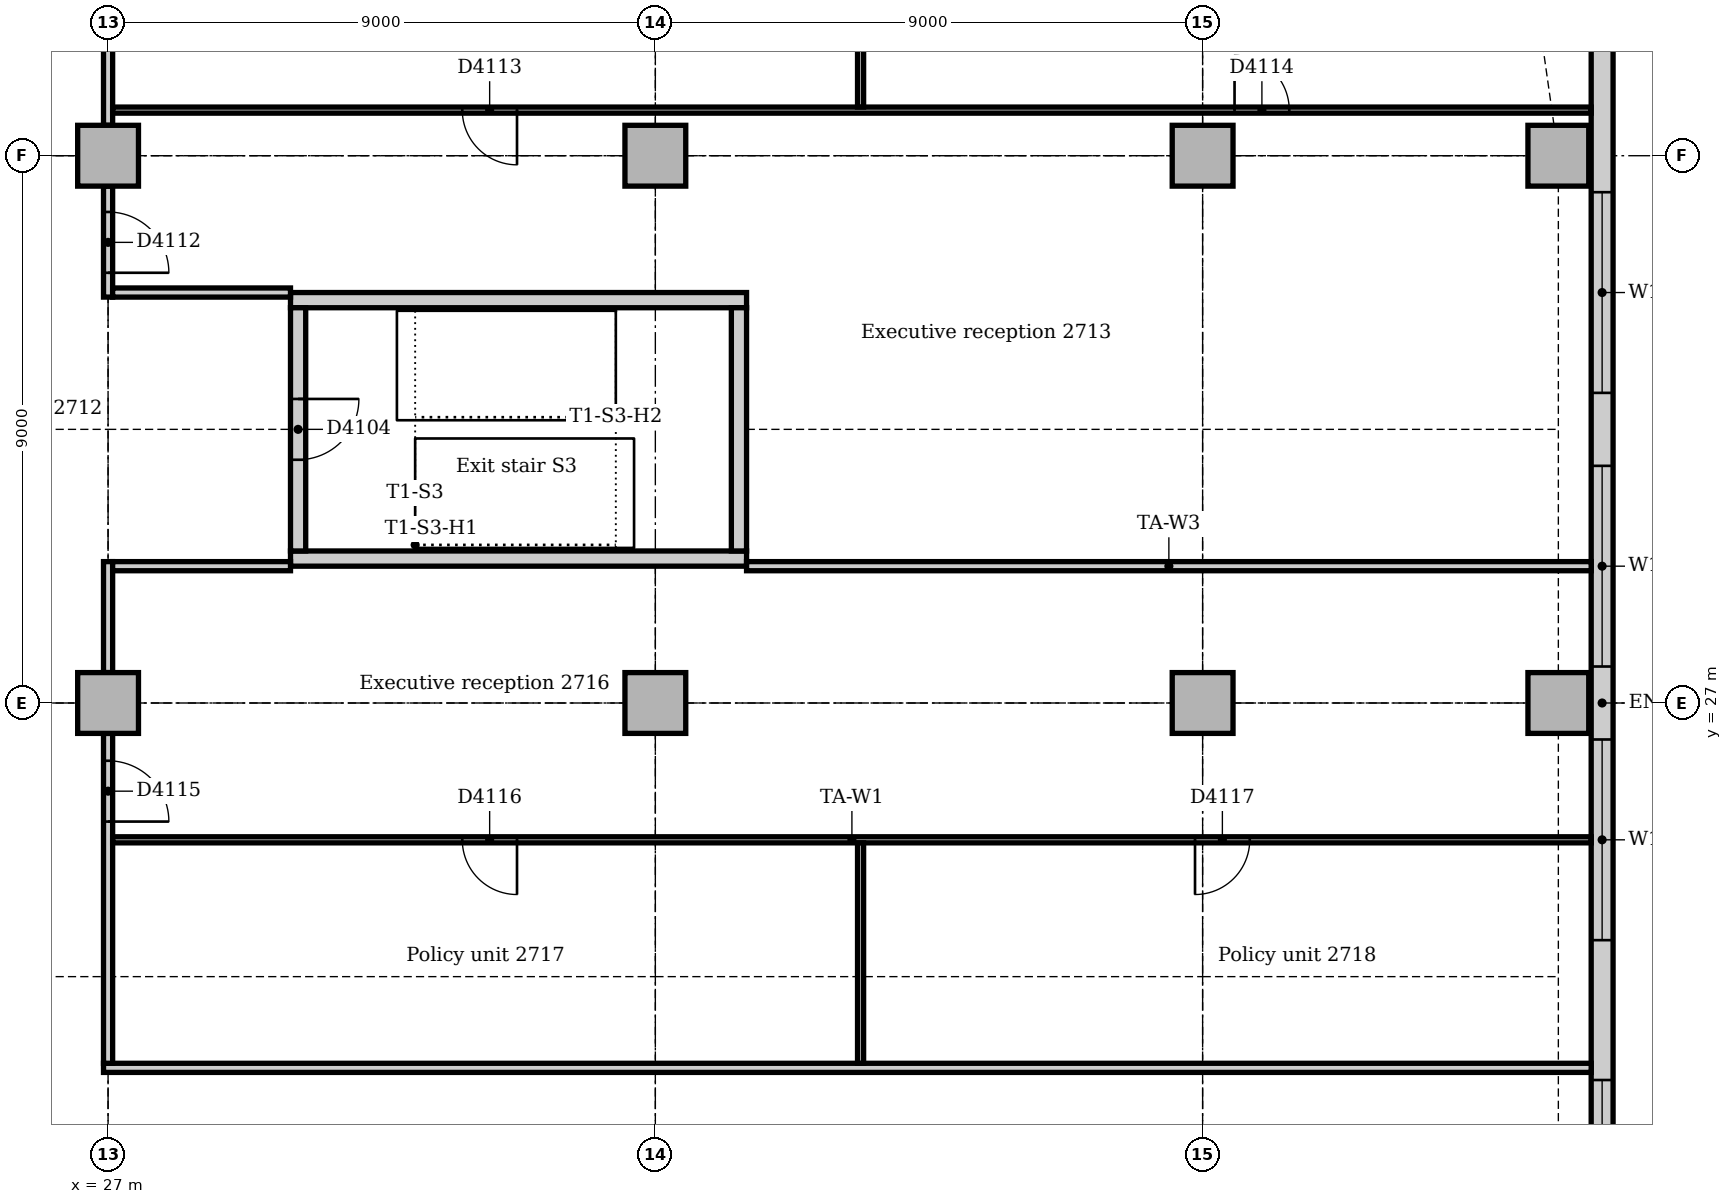
"""IFC4 building model, lengths in metres.
Left out: names, types, materials, properties, quantities, classifications, styles, units other than length and angle.
Written with IfcOpenShell. Run it as: python <this file> out.ifc"""

import sys

from ifc_helpers import new_model, si_unit, direction, frame, frame_2d, origin, origin_2d, place, context, subcontext, project, spatial, rectangle, extrude, element, fill, save


model = new_model("IFC4")
c1 = context("Model", 3, precision=1e-05, world=origin(), true_north=direction((0.0, 1.0)))
c2 = subcontext(c1, "Body", "Model", "MODEL_VIEW")
j1 = project(units=[si_unit("LENGTHUNIT", "METRE"), si_unit("PLANEANGLEUNIT", "RADIAN")], contexts=[c1])
p1 = place(None, origin())
s1 = spatial("IfcSite", under=j1, at=p1, CompositionType="ELEMENT")
p2 = place(p1, origin())
s2 = spatial("IfcBuilding", under=s1, at=p2, CompositionType="ELEMENT")
p3 = place(p2, frame((0.0, 0.0, 116.0)))
s3 = spatial("IfcBuildingStorey", under=s2, at=p3, CompositionType="ELEMENT", Elevation=116.0)
for number, where, z_axis, x_axis in (
    (1, (30.0, 29.375, 0.0), (0.0, 0.0, 1.0), (1.0, 0.0, 0.0)),
    (2, (37.5, 33.625, 0.0), (0.0, 0.0, 1.0), (-1.0, 0.0, 0.0)),
):
    element("IfcWall", number, at=place(p3, frame(where, z_axis=z_axis, x_axis=x_axis)), inside=s3, PredefinedType="SOLIDWALL", context=c2, shape_type="SweptSolid", body=[
        extrude(rectangle(XDim=7.5, YDim=0.25, at=frame_2d((3.75, 0.0))), origin(), (0.0, 0.0, 1.0), 4.0),
    ])
p4 = place(p3, frame((37.375, 29.5, 0.0), z_axis=(0.0, 0.0, 1.0), x_axis=(0.0, 1.0, 0.0)))
e3 = element("IfcWall", 3, at=p4, inside=s3, PredefinedType="SOLIDWALL", context=c2, shape_type="SweptSolid", body=[
    extrude(rectangle(XDim=4.0, YDim=0.25, at=frame_2d((2.0, 0.0))), origin(), (0.0, 0.0, 1.0), 4.0),
])
p5 = place(p3, frame((30.125, 33.5, 0.0), z_axis=(0.0, 0.0, 1.0), x_axis=(0.0, -1.0, 0.0)))
e4 = element("IfcWall", 4, at=p5, inside=s3, PredefinedType="SOLIDWALL", context=c2, shape_type="SweptSolid", body=[
    extrude(rectangle(XDim=4.0, YDim=0.25, at=frame_2d((2.0, 0.0))), origin(), (0.0, 0.0, 1.0), 4.0),
])
p6 = place(p5, frame((1.5, 0.0, 0.0)))
e5 = element("IfcOpeningElement", 5, at=p6, cuts=e4, PredefinedType="OPENING", context=c2, shape_type="SweptSolid", body=[
    extrude(rectangle(XDim=1.0, YDim=2.1, at=frame_2d((0.5, 1.05))), frame((0.0, 0.135, 0.0), z_axis=(0.0, -1.0, 0.0), x_axis=(1.0, 0.0, 0.0)), (0.0, 0.0, 1.0), 0.27),
])
for number, where, z_axis, x_axis in (
    (6, (50.85, 27.0, 0.0), (0.0, 0.0, 1.0), (1.0, 0.0, 0.0)),
    (7, (50.85, 36.0, 0.0), (0.0, 0.0, 1.0), (1.0, 0.0, 0.0)),
    (8, (27.0, 27.0, 0.0), (0.0, 0.0, 1.0), (1.0, 0.0, 0.0)),
    (9, (27.0, 36.0, 0.0), (0.0, 0.0, 1.0), (1.0, 0.0, 0.0)),
    (10, (36.0, 27.0, 0.0), (0.0, 0.0, 1.0), (1.0, 0.0, 0.0)),
    (11, (36.0, 36.0, 0.0), (0.0, 0.0, 1.0), (1.0, 0.0, 0.0)),
    (12, (45.0, 27.0, 0.0), (0.0, 0.0, 1.0), (1.0, 0.0, 0.0)),
    (13, (45.0, 36.0, 0.0), (0.0, 0.0, 1.0), (1.0, 0.0, 0.0)),
):
    element("IfcColumn", number, at=place(p3, frame(where, z_axis=z_axis, x_axis=x_axis)), inside=s3, PredefinedType="COLUMN", context=c2, shape_type="SweptSolid", body=[
        extrude(rectangle(XDim=1.0, YDim=1.0, at=origin_2d()), origin(), (0.0, 0.0, 1.0), 3.85),
    ])
p7 = place(p3, frame((51.57, 14.743, 0.0), z_axis=(0.0, 0.0, 1.0), x_axis=(0.0, 1.0, 0.0)))
e14 = element("IfcWall", 14, at=p7, inside=s3, PredefinedType="STANDARD", context=c2, shape_type="SweptSolid", body=[
    extrude(rectangle(XDim=24.515, YDim=0.36, at=frame_2d((12.257, 0.0))), origin(), (0.0, 0.0, 1.0), 3.85),
])
p8 = place(p7, frame((4.257, 0.0, 0.9)))
e15 = element("IfcOpeningElement", 15, at=p8, cuts=e14, PredefinedType="OPENING", context=c2, shape_type="SweptSolid", body=[
    extrude(rectangle(XDim=1.8, YDim=1.6, at=frame_2d((0.9, 0.8))), frame((0.0, 0.19, 0.0), z_axis=(0.0, -1.0, 0.0), x_axis=(1.0, 0.0, 0.0)), (0.0, 0.0, 1.0), 0.38),
])
p9 = place(p7, frame((8.357, 0.0, 0.9)))
e16 = element("IfcOpeningElement", 16, at=p9, cuts=e14, PredefinedType="OPENING", context=c2, shape_type="SweptSolid", body=[
    extrude(rectangle(XDim=3.3, YDim=1.6, at=frame_2d((1.65, 0.8))), frame((0.0, 0.19, 0.0), z_axis=(0.0, -1.0, 0.0), x_axis=(1.0, 0.0, 0.0)), (0.0, 0.0, 1.0), 0.38),
])
p10 = place(p7, frame((12.857, 0.0, 0.9)))
e17 = element("IfcOpeningElement", 17, at=p10, cuts=e14, PredefinedType="OPENING", context=c2, shape_type="SweptSolid", body=[
    extrude(rectangle(XDim=3.3, YDim=1.6, at=frame_2d((1.65, 0.8))), frame((0.0, 0.19, 0.0), z_axis=(0.0, -1.0, 0.0), x_axis=(1.0, 0.0, 0.0)), (0.0, 0.0, 1.0), 0.38),
])
p11 = place(p7, frame((17.357, 0.0, 0.9)))
e18 = element("IfcOpeningElement", 18, at=p11, cuts=e14, PredefinedType="OPENING", context=c2, shape_type="SweptSolid", body=[
    extrude(rectangle(XDim=3.3, YDim=1.6, at=frame_2d((1.65, 0.8))), frame((0.0, 0.19, 0.0), z_axis=(0.0, -1.0, 0.0), x_axis=(1.0, 0.0, 0.0)), (0.0, 0.0, 1.0), 0.38),
])
p12 = place(p3, frame((26.925, 21.0, 0.0), z_axis=(0.0, 0.0, 1.0), x_axis=(1.0, 0.0, 0.0)))
e19 = element("IfcWall", 19, at=p12, inside=s3, PredefinedType="PARTITIONING", context=c2, shape_type="SweptSolid", body=[
    extrude(rectangle(XDim=24.465, YDim=0.15, at=frame_2d((12.232, 0.0))), origin(), (0.0, 0.0, 1.0), 3.85),
])
p13 = place(p3, frame((27.0, 33.675, 0.0), z_axis=(0.0, 0.0, 1.0), x_axis=(0.0, 1.0, 0.0)))
e20 = element("IfcWall", 20, at=p13, inside=s3, PredefinedType="PARTITIONING", context=c2, shape_type="SweptSolid", body=[
    extrude(rectangle(XDim=1.825, YDim=0.15, at=frame_2d((0.912, 0.0))), origin(), (0.0, 0.0, 1.0), 3.256),
])
p14 = place(p13, frame((0.4, 0.0, 0.0)))
e21 = element("IfcOpeningElement", 21, at=p14, cuts=e20, PredefinedType="OPENING", context=c2, shape_type="SweptSolid", body=[
    extrude(rectangle(XDim=1.0, YDim=2.1, at=frame_2d((0.5, 1.05))), frame((0.0, 0.085, 0.0), z_axis=(0.0, -1.0, 0.0), x_axis=(1.0, 0.0, 0.0)), (0.0, 0.0, 1.0), 0.17),
])
p15 = place(p3, frame((27.0, 36.5, 0.0), z_axis=(0.0, 0.0, 1.0), x_axis=(0.0, 1.0, 0.0)))
e22 = element("IfcWall", 22, at=p15, inside=s3, PredefinedType="PARTITIONING", context=c2, shape_type="SweptSolid", body=[
    extrude(rectangle(XDim=7.1, YDim=0.15, at=frame_2d((3.55, 0.0))), origin(), (0.0, 0.0, 1.0), 3.256),
])
p16 = place(p3, frame((27.0, 21.075, 0.0), z_axis=(0.0, 0.0, 1.0), x_axis=(0.0, 1.0, 0.0)))
e23 = element("IfcWall", 23, at=p16, inside=s3, PredefinedType="PARTITIONING", context=c2, shape_type="SweptSolid", body=[
    extrude(rectangle(XDim=5.425, YDim=0.15, at=frame_2d((2.712, 0.0))), origin(), (0.0, 0.0, 1.0), 3.256),
])
p17 = place(p16, frame((3.975, 0.0, 0.0)))
e24 = element("IfcOpeningElement", 24, at=p17, cuts=e23, PredefinedType="OPENING", context=c2, shape_type="SweptSolid", body=[
    extrude(rectangle(XDim=1.0, YDim=2.1, at=frame_2d((0.5, 1.05))), frame((0.0, 0.085, 0.0), z_axis=(0.0, -1.0, 0.0), x_axis=(1.0, 0.0, 0.0)), (0.0, 0.0, 1.0), 0.17),
])
p18 = place(p3, frame((27.0, 27.5, 0.0), z_axis=(0.0, 0.0, 1.0), x_axis=(0.0, 1.0, 0.0)))
e25 = element("IfcWall", 25, at=p18, inside=s3, PredefinedType="PARTITIONING", context=c2, shape_type="SweptSolid", body=[
    extrude(rectangle(XDim=1.825, YDim=0.15, at=frame_2d((0.912, 0.0))), origin(), (0.0, 0.0, 1.0), 3.256),
])
for number, where, z_axis, x_axis in (
    (26, (27.075, 29.25, 0.0), (0.0, 0.0, 1.0), (1.0, 0.0, 0.0)),
    (27, (27.075, 33.75, 0.0), (0.0, 0.0, 1.0), (1.0, 0.0, 0.0)),
):
    element("IfcWall", number, at=place(p3, frame(where, z_axis=z_axis, x_axis=x_axis)), inside=s3, PredefinedType="PARTITIONING", context=c2, shape_type="SweptSolid", body=[
        extrude(rectangle(XDim=2.925, YDim=0.15, at=frame_2d((1.462, 0.0))), origin(), (0.0, 0.0, 1.0), 3.85),
    ])
p19 = place(p3, frame((37.5, 29.25, 0.0), z_axis=(0.0, 0.0, 1.0), x_axis=(1.0, 0.0, 0.0)))
e28 = element("IfcWall", 28, at=p19, inside=s3, PredefinedType="PARTITIONING", context=c2, shape_type="SweptSolid", body=[
    extrude(rectangle(XDim=13.89, YDim=0.15, at=frame_2d((6.945, 0.0))), origin(), (0.0, 0.0, 1.0), 3.85),
])
p20 = place(p3, frame((27.075, 24.75, 0.0), z_axis=(0.0, 0.0, 1.0), x_axis=(1.0, 0.0, 0.0)))
e29 = element("IfcWall", 29, at=p20, inside=s3, PredefinedType="PARTITIONING", context=c2, shape_type="SweptSolid", body=[
    extrude(rectangle(XDim=24.315, YDim=0.1, at=frame_2d((12.158, 0.0))), origin(), (0.0, 0.0, 1.0), 3.85),
])
p21 = place(p20, frame((5.75, 0.0, 0.0)))
e30 = element("IfcOpeningElement", 30, at=p21, cuts=e29, PredefinedType="OPENING", context=c2, shape_type="SweptSolid", body=[
    extrude(rectangle(XDim=0.9, YDim=2.1, at=frame_2d((0.45, 1.05))), frame((0.0, 0.06, 0.0), z_axis=(0.0, -1.0, 0.0), x_axis=(1.0, 0.0, 0.0)), (0.0, 0.0, 1.0), 0.12),
])
p22 = place(p20, frame((17.8, 0.0, 0.0)))
e31 = element("IfcOpeningElement", 31, at=p22, cuts=e29, PredefinedType="OPENING", context=c2, shape_type="SweptSolid", body=[
    extrude(rectangle(XDim=0.9, YDim=2.1, at=frame_2d((0.45, 1.05))), frame((0.0, 0.06, 0.0), z_axis=(0.0, -1.0, 0.0), x_axis=(1.0, 0.0, 0.0)), (0.0, 0.0, 1.0), 0.12),
])
p23 = place(p3, frame((27.075, 36.75, 0.0), z_axis=(0.0, 0.0, 1.0), x_axis=(1.0, 0.0, 0.0)))
e32 = element("IfcWall", 32, at=p23, inside=s3, PredefinedType="PARTITIONING", context=c2, shape_type="SweptSolid", body=[
    extrude(rectangle(XDim=24.315, YDim=0.1, at=frame_2d((12.158, 0.0))), origin(), (0.0, 0.0, 1.0), 3.85),
])
p24 = place(p23, frame((5.75, 0.0, 0.0)))
e33 = element("IfcOpeningElement", 33, at=p24, cuts=e32, PredefinedType="OPENING", context=c2, shape_type="SweptSolid", body=[
    extrude(rectangle(XDim=0.9, YDim=2.1, at=frame_2d((0.45, 1.05))), frame((0.0, 0.06, 0.0), z_axis=(0.0, -1.0, 0.0), x_axis=(1.0, 0.0, 0.0)), (0.0, 0.0, 1.0), 0.12),
])
p25 = place(p23, frame((18.45, 0.0, 0.0)))
e34 = element("IfcOpeningElement", 34, at=p25, cuts=e32, PredefinedType="OPENING", context=c2, shape_type="SweptSolid", body=[
    extrude(rectangle(XDim=0.9, YDim=2.1, at=frame_2d((0.45, 1.05))), frame((0.0, 0.06, 0.0), z_axis=(0.0, -1.0, 0.0), x_axis=(1.0, 0.0, 0.0)), (0.0, 0.0, 1.0), 0.12),
])
p26 = place(p3, frame((39.375, 36.8, 0.0), z_axis=(0.0, 0.0, 1.0), x_axis=(0.0, 1.0, 0.0)))
e35 = element("IfcWall", 35, at=p26, inside=s3, PredefinedType="PARTITIONING", context=c2, shape_type="SweptSolid", body=[
    extrude(rectangle(XDim=12.34, YDim=0.1, at=frame_2d((6.17, 0.0))), origin(), (0.0, 0.0, 1.0), 3.85),
])
p27 = place(p3, frame((39.375, 21.075, 0.0), z_axis=(0.0, 0.0, 1.0), x_axis=(0.0, 1.0, 0.0)))
e36 = element("IfcWall", 36, at=p27, inside=s3, PredefinedType="PARTITIONING", context=c2, shape_type="SweptSolid", body=[
    extrude(rectangle(XDim=3.625, YDim=0.1, at=frame_2d((1.812, 0.0))), origin(), (0.0, 0.0, 1.0), 3.85),
])
p28 = place(p8, origin())
e37 = element("IfcWindow", 37, at=p28, inside=s3, PartitioningType="SINGLE_PANEL", PredefinedType="WINDOW", context=c2, shape_type="SweptSolid", body=[
    extrude(rectangle(XDim=1.8, YDim=1.6, at=frame_2d((0.9, 0.8))), frame((0.0, 0.13, 0.0), z_axis=(0.0, -1.0, 0.0), x_axis=(1.0, 0.0, 0.0)), (0.0, 0.0, 1.0), 0.06),
])
fill(e15, e37)
p29 = place(p9, origin())
e38 = element("IfcWindow", 38, at=p29, inside=s3, PartitioningType="SINGLE_PANEL", PredefinedType="WINDOW", context=c2, shape_type="SweptSolid", body=[
    extrude(rectangle(XDim=3.3, YDim=1.6, at=frame_2d((1.65, 0.8))), frame((0.0, 0.13, 0.0), z_axis=(0.0, -1.0, 0.0), x_axis=(1.0, 0.0, 0.0)), (0.0, 0.0, 1.0), 0.06),
])
fill(e16, e38)
p30 = place(p10, origin())
e39 = element("IfcWindow", 39, at=p30, inside=s3, PartitioningType="SINGLE_PANEL", PredefinedType="WINDOW", context=c2, shape_type="SweptSolid", body=[
    extrude(rectangle(XDim=3.3, YDim=1.6, at=frame_2d((1.65, 0.8))), frame((0.0, 0.13, 0.0), z_axis=(0.0, -1.0, 0.0), x_axis=(1.0, 0.0, 0.0)), (0.0, 0.0, 1.0), 0.06),
])
fill(e17, e39)
p31 = place(p11, origin())
e40 = element("IfcWindow", 40, at=p31, inside=s3, PartitioningType="SINGLE_PANEL", PredefinedType="WINDOW", context=c2, shape_type="SweptSolid", body=[
    extrude(rectangle(XDim=3.3, YDim=1.6, at=frame_2d((1.65, 0.8))), frame((0.0, 0.13, 0.0), z_axis=(0.0, -1.0, 0.0), x_axis=(1.0, 0.0, 0.0)), (0.0, 0.0, 1.0), 0.06),
])
fill(e18, e40)
p32 = place(p6, origin())
e41 = element("IfcDoor", 41, at=p32, inside=s3, OperationType="SINGLE_SWING_LEFT", PredefinedType="DOOR", context=c2, shape_type="SweptSolid", body=[
    extrude(rectangle(XDim=1.0, YDim=2.1, at=frame_2d((0.5, 1.05))), frame((0.0, 0.025, 0.0), z_axis=(0.0, -1.0, 0.0), x_axis=(1.0, 0.0, 0.0)), (0.0, 0.0, 1.0), 0.05),
])
fill(e5, e41)
p33 = place(p14, frame((1.0, 0.0, 0.0), z_axis=(0.0, 0.0, 1.0), x_axis=(-1.0, 0.0, 0.0)))
e42 = element("IfcDoor", 42, at=p33, inside=s3, OperationType="SINGLE_SWING_RIGHT", PredefinedType="DOOR", context=c2, shape_type="SweptSolid", body=[
    extrude(rectangle(XDim=1.0, YDim=2.1, at=frame_2d((0.5, 1.05))), frame((0.0, 0.025, 0.0), z_axis=(0.0, -1.0, 0.0), x_axis=(1.0, 0.0, 0.0)), (0.0, 0.0, 1.0), 0.05),
])
fill(e21, e42)
p34 = place(p24, frame((0.9, 0.0, 0.0), z_axis=(0.0, 0.0, 1.0), x_axis=(-1.0, 0.0, 0.0)))
e43 = element("IfcDoor", 43, at=p34, inside=s3, OperationType="SINGLE_SWING_LEFT", PredefinedType="DOOR", context=c2, shape_type="SweptSolid", body=[
    extrude(rectangle(XDim=0.9, YDim=2.1, at=frame_2d((0.45, 1.05))), frame((0.0, 0.025, 0.0), z_axis=(0.0, -1.0, 0.0), x_axis=(1.0, 0.0, 0.0)), (0.0, 0.0, 1.0), 0.05),
])
fill(e33, e43)
p35 = place(p25, origin())
e44 = element("IfcDoor", 44, at=p35, inside=s3, OperationType="SINGLE_SWING_LEFT", PredefinedType="DOOR", context=c2, shape_type="SweptSolid", body=[
    extrude(rectangle(XDim=0.9, YDim=2.1, at=frame_2d((0.45, 1.05))), frame((0.0, 0.025, 0.0), z_axis=(0.0, -1.0, 0.0), x_axis=(1.0, 0.0, 0.0)), (0.0, 0.0, 1.0), 0.05),
])
fill(e34, e44)
p36 = place(p17, frame((1.0, 0.0, 0.0), z_axis=(0.0, 0.0, 1.0), x_axis=(-1.0, 0.0, 0.0)))
e45 = element("IfcDoor", 45, at=p36, inside=s3, OperationType="SINGLE_SWING_RIGHT", PredefinedType="DOOR", context=c2, shape_type="SweptSolid", body=[
    extrude(rectangle(XDim=1.0, YDim=2.1, at=frame_2d((0.5, 1.05))), frame((0.0, 0.025, 0.0), z_axis=(0.0, -1.0, 0.0), x_axis=(1.0, 0.0, 0.0)), (0.0, 0.0, 1.0), 0.05),
])
fill(e24, e45)
p37 = place(p21, frame((0.9, 0.0, 0.0), z_axis=(0.0, 0.0, 1.0), x_axis=(-1.0, 0.0, 0.0)))
e46 = element("IfcDoor", 46, at=p37, inside=s3, OperationType="SINGLE_SWING_LEFT", PredefinedType="DOOR", context=c2, shape_type="SweptSolid", body=[
    extrude(rectangle(XDim=0.9, YDim=2.1, at=frame_2d((0.45, 1.05))), frame((0.0, 0.025, 0.0), z_axis=(0.0, -1.0, 0.0), x_axis=(1.0, 0.0, 0.0)), (0.0, 0.0, 1.0), 0.05),
])
fill(e30, e46)
p38 = place(p22, frame((0.9, 0.0, 0.0), z_axis=(0.0, 0.0, 1.0), x_axis=(-1.0, 0.0, 0.0)))
e47 = element("IfcDoor", 47, at=p38, inside=s3, OperationType="SINGLE_SWING_RIGHT", PredefinedType="DOOR", context=c2, shape_type="SweptSolid", body=[
    extrude(rectangle(XDim=0.9, YDim=2.1, at=frame_2d((0.45, 1.05))), frame((0.0, 0.025, 0.0), z_axis=(0.0, -1.0, 0.0), x_axis=(1.0, 0.0, 0.0)), (0.0, 0.0, 1.0), 0.05),
])
fill(e31, e47)
save(model, sys.argv[1])
